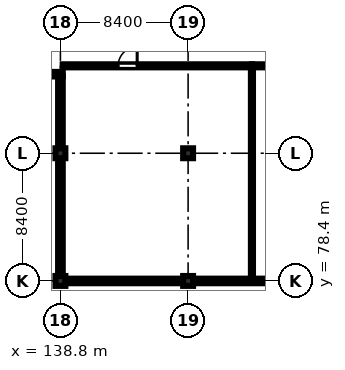
"""IFC4 building model, lengths in metres.
Left out: names, types, materials, properties, quantities, classifications, styles, units other than length and angle.
Written with IfcOpenShell. Run it as: python <this file> out.ifc"""

import sys

from ifc_helpers import new_model, si_unit, direction, frame, frame_2d, origin, origin_2d, place, context, subcontext, project, spatial, rectangle, extrude, element, fill, save


model = new_model("IFC4")
c1 = context("Model", 3, precision=1e-05, world=origin(), true_north=direction((0.0, 1.0)))
c2 = subcontext(c1, "Body", "Model", "MODEL_VIEW")
j1 = project(units=[si_unit("LENGTHUNIT", "METRE"), si_unit("PLANEANGLEUNIT", "RADIAN")], contexts=[c1])
p1 = place(None, origin())
s1 = spatial("IfcSite", under=j1, at=p1, CompositionType="ELEMENT")
p2 = place(p1, origin())
s2 = spatial("IfcBuilding", under=s1, at=p2, CompositionType="ELEMENT")
p3 = place(p2, frame((0.0, 0.0, 65.7)))
s3 = spatial("IfcBuildingStorey", under=s2, at=p3, CompositionType="ELEMENT", Elevation=65.7)
for number, where, z_axis, x_axis in (
    (1, (138.8, 78.4, 0.0), (0.0, 0.0, 1.0), (1.0, 0.0, 0.0)),
    (2, (138.8, 86.8, 0.0), (0.0, 0.0, 1.0), (1.0, 0.0, 0.0)),
    (3, (147.2, 78.4, 0.0), (0.0, 0.0, 1.0), (1.0, 0.0, 0.0)),
    (4, (147.2, 86.8, 0.0), (0.0, 0.0, 1.0), (1.0, 0.0, 0.0)),
):
    element("IfcColumn", number, at=place(p3, frame(where, z_axis=z_axis, x_axis=x_axis)), inside=s3, PredefinedType="COLUMN", context=c2, shape_type="SweptSolid", body=[
        extrude(rectangle(XDim=0.65, YDim=0.65, at=origin_2d()), origin(), (0.0, 0.0, 1.0), 4.3),
    ])
p4 = place(p3, frame((146.875, 78.4, 0.0), z_axis=(0.0, 0.0, 1.0), x_axis=(-1.0, 0.0, 0.0)))
e5 = element("IfcWall", 5, at=p4, inside=s3, PredefinedType="STANDARD", context=c2, shape_type="SweptSolid", body=[
    extrude(rectangle(XDim=7.75, YDim=0.3, at=frame_2d((3.875, 0.0))), origin(), (0.0, 0.0, 1.0), 3.7),
])
p5 = place(p4, frame((1.15, 0.0, 0.95)))
e6 = element("IfcOpeningElement", 6, at=p5, cuts=e5, PredefinedType="OPENING", context=c2, shape_type="SweptSolid", body=[
    extrude(rectangle(XDim=2.5, YDim=1.9, at=frame_2d((1.25, 0.95))), frame((0.0, 0.16, 0.0), z_axis=(0.0, -1.0, 0.0), x_axis=(1.0, 0.0, 0.0)), (0.0, 0.0, 1.0), 0.32),
])
p6 = place(p3, frame((155.275, 78.4, 0.0), z_axis=(0.0, 0.0, 1.0), x_axis=(-1.0, 0.0, 0.0)))
e7 = element("IfcWall", 7, at=p6, inside=s3, PredefinedType="STANDARD", context=c2, shape_type="SweptSolid", body=[
    extrude(rectangle(XDim=7.75, YDim=0.3, at=frame_2d((3.875, 0.0))), origin(), (0.0, 0.0, 1.0), 3.7),
])
p7 = place(p6, frame((1.15, 0.0, 0.95)))
e8 = element("IfcOpeningElement", 8, at=p7, cuts=e7, PredefinedType="OPENING", context=c2, shape_type="SweptSolid", body=[
    extrude(rectangle(XDim=2.5, YDim=1.9, at=frame_2d((1.25, 0.95))), frame((0.0, 0.16, 0.0), z_axis=(0.0, -1.0, 0.0), x_axis=(1.0, 0.0, 0.0)), (0.0, 0.0, 1.0), 0.32),
])
p8 = place(p3, frame((138.8, 78.725, 0.0), z_axis=(0.0, 0.0, 1.0), x_axis=(0.0, 1.0, 0.0)))
e9 = element("IfcWall", 9, at=p8, inside=s3, PredefinedType="STANDARD", context=c2, shape_type="SweptSolid", body=[
    extrude(rectangle(XDim=7.75, YDim=0.3, at=frame_2d((3.875, 0.0))), origin(), (0.0, 0.0, 1.0), 3.7),
])
p9 = place(p8, frame((2.4, 0.0, 0.95)))
e10 = element("IfcOpeningElement", 10, at=p9, cuts=e9, PredefinedType="OPENING", context=c2, shape_type="SweptSolid", body=[
    extrude(rectangle(XDim=1.5, YDim=1.8, at=frame_2d((0.75, 0.9))), frame((0.0, 0.16, 0.0), z_axis=(0.0, -1.0, 0.0), x_axis=(1.0, 0.0, 0.0)), (0.0, 0.0, 1.0), 0.32),
])
p10 = place(p3, frame((138.8, 87.125, 0.0), z_axis=(0.0, 0.0, 1.0), x_axis=(0.0, 1.0, 0.0)))
e11 = element("IfcWall", 11, at=p10, inside=s3, PredefinedType="STANDARD", context=c2, shape_type="SweptSolid", body=[
    extrude(rectangle(XDim=4.725, YDim=0.3, at=frame_2d((2.363, 0.0))), origin(), (0.0, 0.0, 1.0), 3.7),
])
p11 = place(p10, frame((2.4, 0.0, 0.95)))
e12 = element("IfcOpeningElement", 12, at=p11, cuts=e11, PredefinedType="OPENING", context=c2, shape_type="SweptSolid", body=[
    extrude(rectangle(XDim=1.5, YDim=1.8, at=frame_2d((0.75, 0.9))), frame((0.0, 0.16, 0.0), z_axis=(0.0, -1.0, 0.0), x_axis=(1.0, 0.0, 0.0)), (0.0, 0.0, 1.0), 0.32),
])
p12 = place(p3, frame((138.95, 92.0, 0.0), z_axis=(0.0, 0.0, 1.0), x_axis=(-1.0, 0.0, 0.0)))
e13 = element("IfcWall", 13, at=p12, inside=s3, PredefinedType="STANDARD", context=c2, shape_type="SweptSolid", body=[
    extrude(rectangle(XDim=8.7, YDim=0.3, at=frame_2d((4.35, 0.0))), origin(), (0.0, 0.0, 1.0), 4.3),
])
p13 = place(p3, frame((138.685, 78.4, 4.5), z_axis=(0.0, 0.0, 1.0), x_axis=(1.0, 0.0, 0.0)))
e14 = element("IfcWall", 14, at=p13, inside=s3, PredefinedType="PARAPET", context=c2, shape_type="SweptSolid", body=[
    extrude(rectangle(XDim=25.03, YDim=0.23, at=frame_2d((12.515, 0.0))), origin(), (0.0, 0.0, 1.0), 1.35),
])
p14 = place(p3, frame((130.285, 92.0, 4.5), z_axis=(0.0, 0.0, 1.0), x_axis=(1.0, 0.0, 0.0)))
e15 = element("IfcWall", 15, at=p14, inside=s3, PredefinedType="PARAPET", context=c2, shape_type="SweptSolid", body=[
    extrude(rectangle(XDim=8.63, YDim=0.23, at=frame_2d((4.315, 0.0))), origin(), (0.0, 0.0, 1.0), 1.35),
])
p15 = place(p3, frame((138.8, 91.885, 4.5), z_axis=(0.0, 0.0, 1.0), x_axis=(0.0, -1.0, 0.0)))
e16 = element("IfcWall", 16, at=p15, inside=s3, PredefinedType="PARAPET", context=c2, shape_type="SweptSolid", body=[
    extrude(rectangle(XDim=13.37, YDim=0.23, at=frame_2d((6.685, 0.0))), origin(), (0.0, 0.0, 1.0), 1.35),
])
p16 = place(p3, frame((138.95, 92.55, 0.0), z_axis=(0.0, 0.0, 1.0), x_axis=(1.0, 0.0, 0.0)))
e17 = element("IfcWall", 17, at=p16, inside=s3, PredefinedType="SOLIDWALL", context=c2, shape_type="SweptSolid", body=[
    extrude(rectangle(XDim=12.45, YDim=0.2, at=frame_2d((6.225, 0.0))), origin(), (0.0, 0.0, 1.0), 4.3),
])
p17 = place(p16, frame((3.65, 0.0, 0.0)))
e18 = element("IfcOpeningElement", 18, at=p17, cuts=e17, PredefinedType="OPENING", context=c2, shape_type="SweptSolid", body=[
    extrude(rectangle(XDim=1.25, YDim=2.2, at=frame_2d((0.625, 1.1))), frame((0.0, 0.11, 0.0), z_axis=(0.0, -1.0, 0.0), x_axis=(1.0, 0.0, 0.0)), (0.0, 0.0, 1.0), 0.22),
])
p18 = place(p3, frame((151.4, 92.55, 0.0), z_axis=(0.0, 0.0, 1.0), x_axis=(1.0, 0.0, 0.0)))
e19 = element("IfcWall", 19, at=p18, inside=s3, PredefinedType="SOLIDWALL", context=c2, shape_type="SweptSolid", body=[
    extrude(rectangle(XDim=11.95, YDim=0.2, at=frame_2d((5.975, 0.0))), origin(), (0.0, 0.0, 1.0), 4.3),
])
p19 = place(p18, frame((6.8, 0.0, 0.0)))
e20 = element("IfcOpeningElement", 20, at=p19, cuts=e19, PredefinedType="OPENING", context=c2, shape_type="SweptSolid", body=[
    extrude(rectangle(XDim=1.5, YDim=2.2, at=frame_2d((0.75, 1.1))), frame((0.0, 0.11, 0.0), z_axis=(0.0, -1.0, 0.0), x_axis=(1.0, 0.0, 0.0)), (0.0, 0.0, 1.0), 0.22),
])
p20 = place(p3, frame((151.4, 78.55, 0.0), z_axis=(0.0, 0.0, 1.0), x_axis=(0.0, 1.0, 0.0)))
e21 = element("IfcWall", 21, at=p20, inside=s3, PredefinedType="PARTITIONING", context=c2, shape_type="SweptSolid", body=[
    extrude(rectangle(XDim=14.0, YDim=0.135, at=frame_2d((7.0, 0.0))), origin(), (0.0, 0.0, 1.0), 3.85),
])
p21 = place(p5, origin())
e22 = element("IfcWindow", 22, at=p21, inside=s3, PartitioningType="TRIPLE_PANEL_VERTICAL", PredefinedType="WINDOW", context=c2, shape_type="SweptSolid", body=[
    extrude(rectangle(XDim=2.5, YDim=1.9, at=frame_2d((1.25, 0.95))), frame((0.0, 0.03, 0.0), z_axis=(0.0, -1.0, 0.0), x_axis=(1.0, 0.0, 0.0)), (0.0, 0.0, 1.0), 0.06),
])
fill(e6, e22)
p22 = place(p7, origin())
e23 = element("IfcWindow", 23, at=p22, inside=s3, PartitioningType="TRIPLE_PANEL_VERTICAL", PredefinedType="WINDOW", context=c2, shape_type="SweptSolid", body=[
    extrude(rectangle(XDim=2.5, YDim=1.9, at=frame_2d((1.25, 0.95))), frame((0.0, 0.03, 0.0), z_axis=(0.0, -1.0, 0.0), x_axis=(1.0, 0.0, 0.0)), (0.0, 0.0, 1.0), 0.06),
])
fill(e8, e23)
p23 = place(p9, origin())
e24 = element("IfcWindow", 24, at=p23, inside=s3, PartitioningType="DOUBLE_PANEL_VERTICAL", PredefinedType="WINDOW", context=c2, shape_type="SweptSolid", body=[
    extrude(rectangle(XDim=1.5, YDim=1.8, at=frame_2d((0.75, 0.9))), frame((0.0, 0.03, 0.0), z_axis=(0.0, -1.0, 0.0), x_axis=(1.0, 0.0, 0.0)), (0.0, 0.0, 1.0), 0.06),
])
fill(e10, e24)
p24 = place(p11, origin())
e25 = element("IfcWindow", 25, at=p24, inside=s3, PartitioningType="DOUBLE_PANEL_VERTICAL", PredefinedType="WINDOW", context=c2, shape_type="SweptSolid", body=[
    extrude(rectangle(XDim=1.5, YDim=1.8, at=frame_2d((0.75, 0.9))), frame((0.0, 0.03, 0.0), z_axis=(0.0, -1.0, 0.0), x_axis=(1.0, 0.0, 0.0)), (0.0, 0.0, 1.0), 0.06),
])
fill(e12, e25)
p25 = place(p17, origin())
e26 = element("IfcDoor", 26, at=p25, inside=s3, OperationType="SINGLE_SWING_RIGHT", PredefinedType="DOOR", context=c2, shape_type="SweptSolid", body=[
    extrude(rectangle(XDim=1.25, YDim=2.2, at=frame_2d((0.625, 1.1))), frame((0.0, 0.025, 0.0), z_axis=(0.0, -1.0, 0.0), x_axis=(1.0, 0.0, 0.0)), (0.0, 0.0, 1.0), 0.05),
])
fill(e18, e26)
save(model, sys.argv[1])
